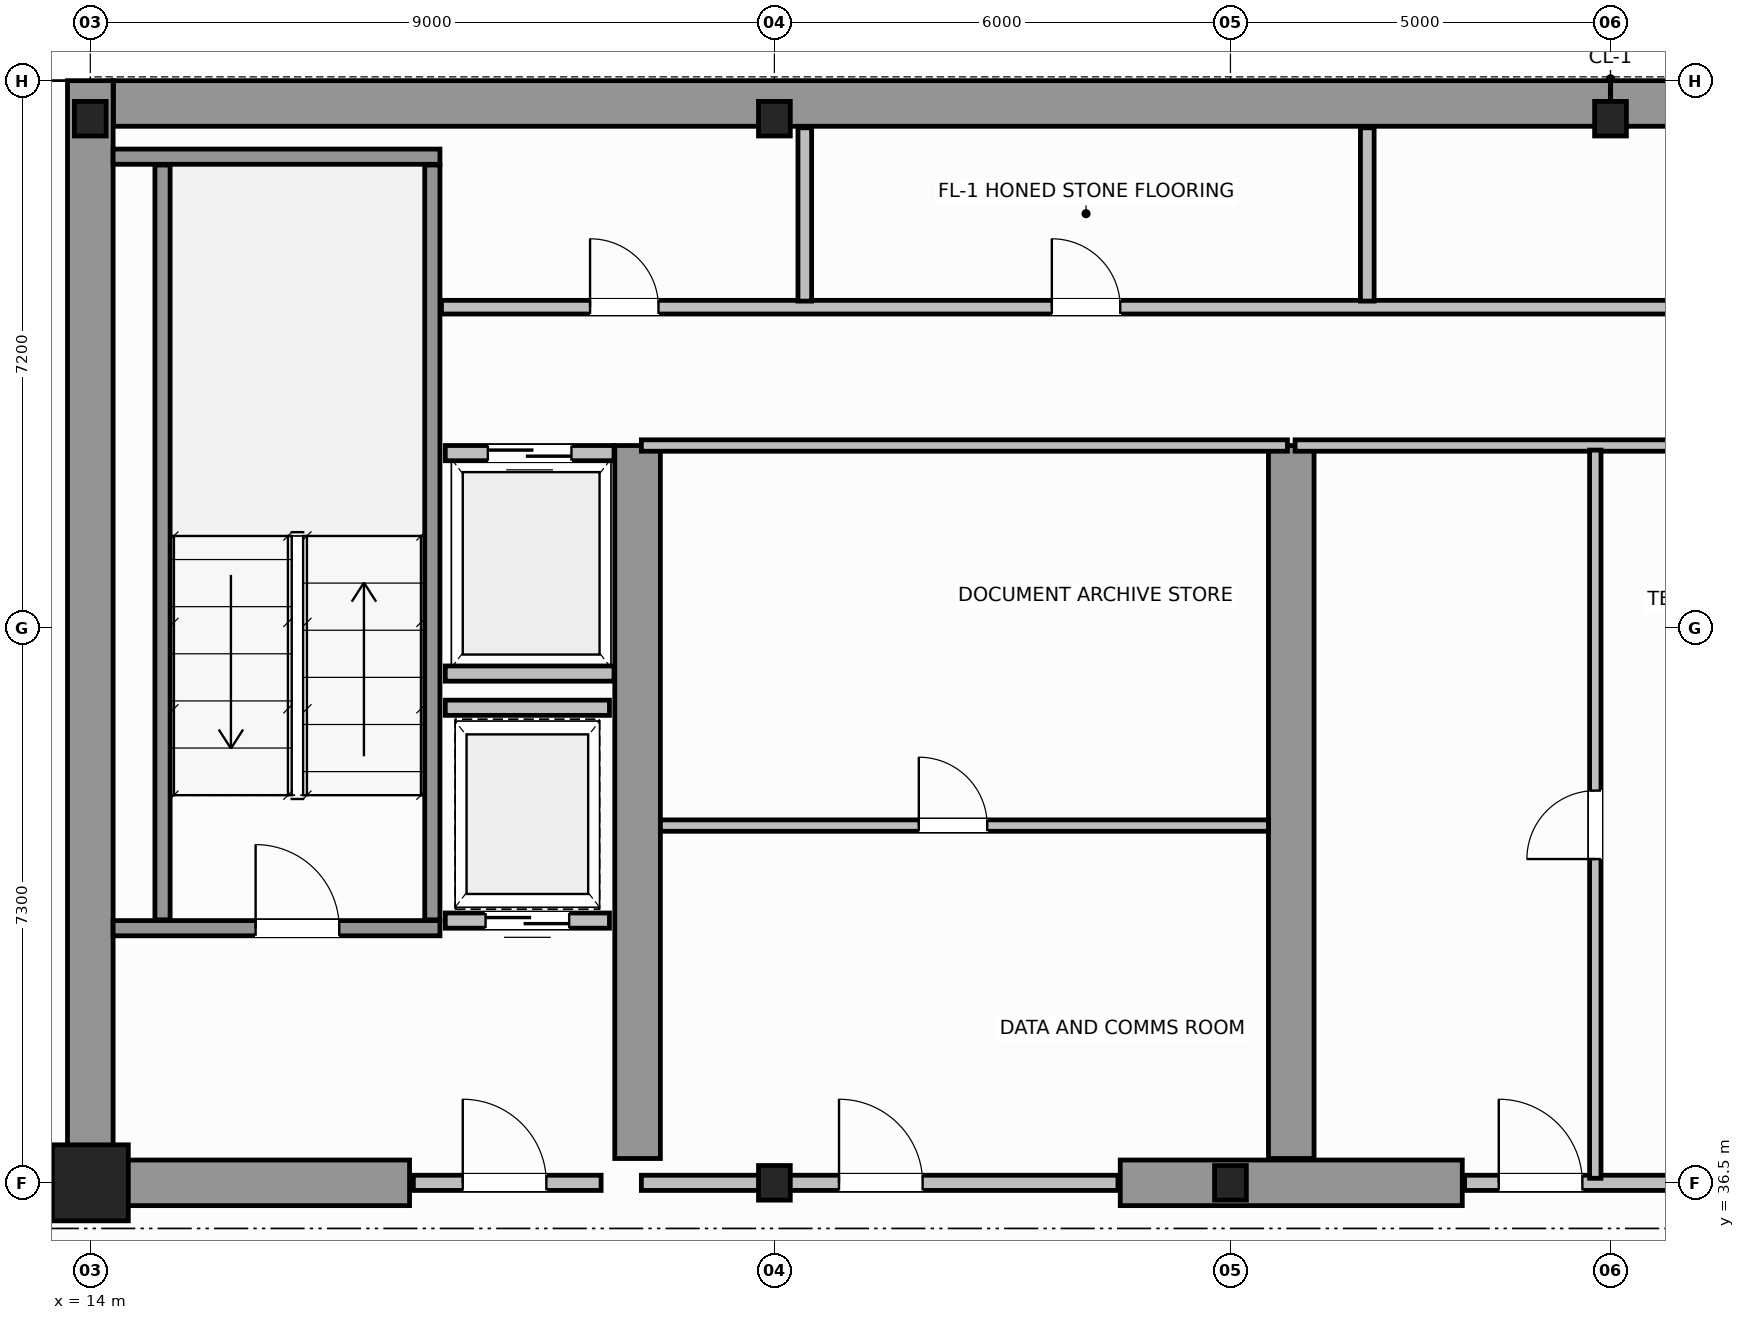
"""IFC4 building model, lengths in metres.
Left out: names, types, materials, properties, quantities, classifications, styles, units other than length and angle.
Written with IfcOpenShell. Run it as: python <this file> out.ifc"""

import sys

from ifc_helpers import new_model, si_unit, direction, frame, frame_2d, origin, origin_2d, place, context, subcontext, project, spatial, rectangle, i_section, extrude, source, transform, mapped, element, fill, save


model = new_model("IFC4")
c1 = context("Model", 3, precision=1e-05, world=origin(), true_north=direction((0.0, 1.0)))
c2 = subcontext(c1, "Body", "Model", "MODEL_VIEW")
j1 = project(units=[si_unit("LENGTHUNIT", "METRE"), si_unit("PLANEANGLEUNIT", "RADIAN")], contexts=[c1])
p1 = place(None, origin())
s1 = spatial("IfcSite", under=j1, at=p1, CompositionType="ELEMENT")
p2 = place(p1, origin())
s2 = spatial("IfcBuilding", under=s1, at=p2, CompositionType="ELEMENT")
p3 = place(p2, frame((0.0, 0.0, 238.4)))
s3 = spatial("IfcBuildingStorey", under=s2, at=p3, CompositionType="ELEMENT", Elevation=238.4)
m1 = source(origin(), c2, "Body", "SweptSolid", [
    extrude(rectangle(XDim=1.0, YDim=1.0, at=origin_2d()), origin(), (0.0, 0.0, 1.0), 3.8),
])
p4 = place(p3, frame((14.0, 36.5, 0.0), z_axis=(0.0, 0.0, 1.0), x_axis=(1.0, 0.0, 0.0)))
e1 = element("IfcColumn", 1, at=p4, inside=s3, PredefinedType="COLUMN", context=c2, shape_type="MappedRepresentation", body=[
    mapped(m1, transform((0.0, 0.0, 0.0), scale=1.0)),
])
m2 = source(origin(), c2, "Body", "SweptSolid", [
    extrude(i_section(OverallWidth=0.418, OverallDepth=0.455, WebThickness=0.042, FlangeThickness=0.058, FilletRadius=0.015, at=origin_2d()), origin(), (0.0, 0.0, 1.0), 3.8),
])
for number, where, z_axis, x_axis in (
    (2, (23.0, 36.5, 0.0), (0.0, 0.0, 1.0), (1.0, 0.0, 0.0)),
    (3, (29.0, 36.5, 0.0), (0.0, 0.0, 1.0), (1.0, 0.0, 0.0)),
    (4, (14.0, 50.5, 0.0), (0.0, 0.0, 1.0), (1.0, 0.0, 0.0)),
    (5, (23.0, 50.5, 0.0), (0.0, 0.0, 1.0), (1.0, 0.0, 0.0)),
    (6, (34.0, 50.5, 0.0), (0.0, 0.0, 1.0), (1.0, 0.0, 0.0)),
):
    element("IfcColumn", number, at=place(p3, frame(where, z_axis=z_axis, x_axis=x_axis)), inside=s3, PredefinedType="COLUMN", context=c2, shape_type="MappedRepresentation", body=[
        mapped(m2, transform((0.0, 0.0, 0.0), scale=1.0)),
    ])
for number, where, z_axis, x_axis in (
    (7, (14.304, 50.7, 0.0), (0.0, 0.0, 1.0), (1.0, 0.0, 0.0)),
    (8, (34.002, 50.7, 0.0), (0.0, 0.0, 1.0), (1.0, 0.0, 0.0)),
):
    element("IfcWall", number, at=place(p3, frame(where, z_axis=z_axis, x_axis=x_axis)), inside=s3, PredefinedType="SHEAR", context=c2, shape_type="SweptSolid", body=[
        extrude(rectangle(XDim=19.694, YDim=0.6, at=frame_2d((9.847, 0.0))), origin(), (0.0, 0.0, 1.0), 3.8),
    ])
p5 = place(p3, frame((14.0, 36.5, 0.0), z_axis=(0.0, 0.0, 1.0), x_axis=(0.0, 1.0, 0.0)))
e9 = element("IfcWall", 9, at=p5, inside=s3, PredefinedType="SHEAR", context=c2, shape_type="SweptSolid", body=[
    extrude(rectangle(XDim=14.5, YDim=0.6, at=frame_2d((7.25, 0.0))), origin(), (0.0, 0.0, 1.0), 3.8),
])
p6 = place(p3, frame((14.32, 36.5, 0.0), z_axis=(0.0, 0.0, 1.0), x_axis=(1.0, 0.0, 0.0)))
e10 = element("IfcWall", 10, at=p6, inside=s3, PredefinedType="SHEAR", context=c2, shape_type="SweptSolid", body=[
    extrude(rectangle(XDim=3.88, YDim=0.6, at=frame_2d((1.94, 0.0))), origin(), (0.0, 0.0, 1.0), 2.58),
])
p7 = place(p3, frame((27.55, 36.5, 0.0), z_axis=(0.0, 0.0, 1.0), x_axis=(1.0, 0.0, 0.0)))
e11 = element("IfcWall", 11, at=p7, inside=s3, PredefinedType="SHEAR", context=c2, shape_type="SweptSolid", body=[
    extrude(rectangle(XDim=4.5, YDim=0.6, at=frame_2d((2.25, 0.0))), origin(), (0.0, 0.0, 1.0), 3.8),
])
for number, where, z_axis, x_axis in (
    (12, (21.2, 36.82, 0.0), (0.0, 0.0, 1.0), (0.0, 1.0, 0.0)),
    (13, (29.8, 36.82, 0.0), (0.0, 0.0, 1.0), (0.0, 1.0, 0.0)),
):
    element("IfcWall", number, at=place(p3, frame(where, z_axis=z_axis, x_axis=x_axis)), inside=s3, PredefinedType="SHEAR", context=c2, shape_type="SweptSolid", body=[
        extrude(rectangle(XDim=9.38, YDim=0.6, at=frame_2d((4.69, 0.0))), origin(), (0.0, 0.0, 1.0), 3.8),
    ])
p8 = place(p3, frame((14.3, 39.85, 0.0), z_axis=(0.0, 0.0, 1.0), x_axis=(1.0, 0.0, 0.0)))
e14 = element("IfcWall", 14, at=p8, inside=s3, PredefinedType="SOLIDWALL", context=c2, shape_type="SweptSolid", body=[
    extrude(rectangle(XDim=4.3, YDim=0.2, at=frame_2d((2.15, 0.0))), origin(), (0.0, 0.0, 1.0), 3.8),
])
p9 = place(p8, frame((1.875, 0.0, 0.0)))
e15 = element("IfcOpeningElement", 15, at=p9, cuts=e14, PredefinedType="OPENING", context=c2, shape_type="SweptSolid", body=[
    extrude(rectangle(XDim=1.1, YDim=2.15, at=frame_2d((0.55, 1.075))), frame((0.0, 0.11, 0.0), z_axis=(0.0, -1.0, 0.0), x_axis=(1.0, 0.0, 0.0)), (0.0, 0.0, 1.0), 0.22),
])
p10 = place(p3, frame((14.3, 50.0, 0.0), z_axis=(0.0, 0.0, 1.0), x_axis=(1.0, 0.0, 0.0)))
e16 = element("IfcWall", 16, at=p10, inside=s3, PredefinedType="SOLIDWALL", context=c2, shape_type="SweptSolid", body=[
    extrude(rectangle(XDim=4.3, YDim=0.2, at=frame_2d((2.15, 0.0))), origin(), (0.0, 0.0, 1.0), 3.8),
])
for number, where, z_axis, x_axis in (
    (17, (14.95, 39.96, 0.0), (0.0, 0.0, 1.0), (0.0, 1.0, 0.0)),
    (18, (18.5, 39.96, 0.0), (0.0, 0.0, 1.0), (0.0, 1.0, 0.0)),
):
    element("IfcWall", number, at=place(p3, frame(where, z_axis=z_axis, x_axis=x_axis)), inside=s3, PredefinedType="SOLIDWALL", context=c2, shape_type="SweptSolid", body=[
        extrude(rectangle(XDim=9.93, YDim=0.2, at=frame_2d((4.965, 0.0))), origin(), (0.0, 0.0, 1.0), 3.8),
    ])
p11 = place(p3, frame((18.25, 36.5, 0.0), z_axis=(0.0, 0.0, 1.0), x_axis=(1.0, 0.0, 0.0)))
e19 = element("IfcWall", 19, at=p11, inside=s3, PredefinedType="SOLIDWALL", context=c2, shape_type="SweptSolid", body=[
    extrude(rectangle(XDim=2.47, YDim=0.2, at=frame_2d((1.235, 0.0))), origin(), (0.0, 0.0, 1.0), 2.57),
])
p12 = place(p11, frame((0.65, 0.0, 0.0)))
e20 = element("IfcOpeningElement", 20, at=p12, cuts=e19, PredefinedType="OPENING", context=c2, shape_type="SweptSolid", body=[
    extrude(rectangle(XDim=1.1, YDim=2.15, at=frame_2d((0.55, 1.075))), frame((0.0, 0.11, 0.0), z_axis=(0.0, -1.0, 0.0), x_axis=(1.0, 0.0, 0.0)), (0.0, 0.0, 1.0), 0.22),
])
p13 = place(p3, frame((18.67, 46.1, 0.0), z_axis=(0.0, 0.0, 1.0), x_axis=(1.0, 0.0, 0.0)))
e21 = element("IfcWall", 21, at=p13, inside=s3, PredefinedType="SOLIDWALL", context=c2, shape_type="SweptSolid", body=[
    extrude(rectangle(XDim=2.22, YDim=0.2, at=frame_2d((1.11, 0.0))), origin(), (0.0, 0.0, 1.0), 3.58),
])
p14 = place(p13, frame((0.56, 0.0, 0.0)))
e22 = element("IfcOpeningElement", 22, at=p14, cuts=e21, PredefinedType="OPENING", context=c2, shape_type="SweptSolid", body=[
    extrude(rectangle(XDim=1.1, YDim=2.15, at=frame_2d((0.55, 1.075))), frame((0.0, 0.11, 0.0), z_axis=(0.0, -1.0, 0.0), x_axis=(1.0, 0.0, 0.0)), (0.0, 0.0, 1.0), 0.22),
])
p15 = place(p3, frame((18.67, 43.2, 0.0), z_axis=(0.0, 0.0, 1.0), x_axis=(1.0, 0.0, 0.0)))
e23 = element("IfcWall", 23, at=p15, inside=s3, PredefinedType="SOLIDWALL", context=c2, shape_type="SweptSolid", body=[
    extrude(rectangle(XDim=2.22, YDim=0.2, at=frame_2d((1.11, 0.0))), origin(), (0.0, 0.0, 1.0), 3.58),
])
p16 = place(p3, frame((18.67, 39.95, 0.0), z_axis=(0.0, 0.0, 1.0), x_axis=(1.0, 0.0, 0.0)))
e24 = element("IfcWall", 24, at=p16, inside=s3, PredefinedType="SOLIDWALL", context=c2, shape_type="SweptSolid", body=[
    extrude(rectangle(XDim=2.16, YDim=0.2, at=frame_2d((1.08, 0.0))), origin(), (0.0, 0.0, 1.0), 3.58),
])
p17 = place(p16, frame((0.53, 0.0, 0.0)))
e25 = element("IfcOpeningElement", 25, at=p17, cuts=e24, PredefinedType="OPENING", context=c2, shape_type="SweptSolid", body=[
    extrude(rectangle(XDim=1.1, YDim=2.15, at=frame_2d((0.55, 1.075))), frame((0.0, 0.11, 0.0), z_axis=(0.0, -1.0, 0.0), x_axis=(1.0, 0.0, 0.0)), (0.0, 0.0, 1.0), 0.22),
])
p18 = place(p3, frame((18.67, 42.75, 0.0), z_axis=(0.0, 0.0, 1.0), x_axis=(1.0, 0.0, 0.0)))
e26 = element("IfcWall", 26, at=p18, inside=s3, PredefinedType="SOLIDWALL", context=c2, shape_type="SweptSolid", body=[
    extrude(rectangle(XDim=2.16, YDim=0.2, at=frame_2d((1.08, 0.0))), origin(), (0.0, 0.0, 1.0), 3.58),
])
p19 = place(p3, frame((21.25, 36.5, 0.0), z_axis=(0.0, 0.0, 1.0), x_axis=(1.0, 0.0, 0.0)))
e27 = element("IfcWall", 27, at=p19, inside=s3, PredefinedType="SOLIDWALL", context=c2, shape_type="SweptSolid", body=[
    extrude(rectangle(XDim=6.27, YDim=0.2, at=frame_2d((3.135, 0.0))), origin(), (0.0, 0.0, 1.0), 2.57),
])
p20 = place(p19, frame((2.6, 0.0, 0.0)))
e28 = element("IfcOpeningElement", 28, at=p20, cuts=e27, PredefinedType="OPENING", context=c2, shape_type="SweptSolid", body=[
    extrude(rectangle(XDim=1.1, YDim=2.15, at=frame_2d((0.55, 1.075))), frame((0.0, 0.11, 0.0), z_axis=(0.0, -1.0, 0.0), x_axis=(1.0, 0.0, 0.0)), (0.0, 0.0, 1.0), 0.22),
])
p21 = place(p3, frame((21.25, 46.2, 0.0), z_axis=(0.0, 0.0, 1.0), x_axis=(1.0, 0.0, 0.0)))
e29 = element("IfcWall", 29, at=p21, inside=s3, PredefinedType="PARTITIONING", context=c2, shape_type="SweptSolid", body=[
    extrude(rectangle(XDim=8.5, YDim=0.15, at=frame_2d((4.25, 0.0))), origin(), (0.0, 0.0, 1.0), 3.58),
])
p22 = place(p3, frame((21.5, 41.2, 0.0), z_axis=(0.0, 0.0, 1.0), x_axis=(1.0, 0.0, 0.0)))
e30 = element("IfcWall", 30, at=p22, inside=s3, PredefinedType="PARTITIONING", context=c2, shape_type="SweptSolid", body=[
    extrude(rectangle(XDim=8.0, YDim=0.15, at=frame_2d((4.0, 0.0))), origin(), (0.0, 0.0, 1.0), 3.58),
])
p23 = place(p22, frame((3.4, 0.0, 0.0)))
e31 = element("IfcOpeningElement", 31, at=p23, cuts=e30, PredefinedType="OPENING", context=c2, shape_type="SweptSolid", body=[
    extrude(rectangle(XDim=0.9, YDim=2.1, at=frame_2d((0.45, 1.05))), frame((0.0, 0.085, 0.0), z_axis=(0.0, -1.0, 0.0), x_axis=(1.0, 0.0, 0.0)), (0.0, 0.0, 1.0), 0.17),
])
p24 = place(p3, frame((32.08, 36.5, 0.0), z_axis=(0.0, 0.0, 1.0), x_axis=(1.0, 0.0, 0.0)))
e32 = element("IfcWall", 32, at=p24, inside=s3, PredefinedType="SOLIDWALL", context=c2, shape_type="SweptSolid", body=[
    extrude(rectangle(XDim=4.04, YDim=0.2, at=frame_2d((2.02, 0.0))), origin(), (0.0, 0.0, 1.0), 3.02),
])
p25 = place(p24, frame((0.45, 0.0, 0.0)))
e33 = element("IfcOpeningElement", 33, at=p25, cuts=e32, PredefinedType="OPENING", context=c2, shape_type="SweptSolid", body=[
    extrude(rectangle(XDim=1.1, YDim=2.15, at=frame_2d((0.55, 1.075))), frame((0.0, 0.11, 0.0), z_axis=(0.0, -1.0, 0.0), x_axis=(1.0, 0.0, 0.0)), (0.0, 0.0, 1.0), 0.22),
])
p26 = place(p3, frame((29.85, 46.2, 0.0), z_axis=(0.0, 0.0, 1.0), x_axis=(1.0, 0.0, 0.0)))
e34 = element("IfcWall", 34, at=p26, inside=s3, PredefinedType="PARTITIONING", context=c2, shape_type="SweptSolid", body=[
    extrude(rectangle(XDim=8.5, YDim=0.15, at=frame_2d((4.25, 0.0))), origin(), (0.0, 0.0, 1.0), 3.58),
])
p27 = place(p3, frame((33.8, 36.56, 0.0), z_axis=(0.0, 0.0, 1.0), x_axis=(0.0, 1.0, 0.0)))
e35 = element("IfcWall", 35, at=p27, inside=s3, PredefinedType="PARTITIONING", context=c2, shape_type="SweptSolid", body=[
    extrude(rectangle(XDim=9.58, YDim=0.15, at=frame_2d((4.79, 0.0))), origin(), (0.0, 0.0, 1.0), 3.58),
])
p28 = place(p27, frame((4.2, 0.0, 0.0)))
e36 = element("IfcOpeningElement", 36, at=p28, cuts=e35, PredefinedType="OPENING", context=c2, shape_type="SweptSolid", body=[
    extrude(rectangle(XDim=0.9, YDim=2.1, at=frame_2d((0.45, 1.05))), frame((0.0, 0.085, 0.0), z_axis=(0.0, -1.0, 0.0), x_axis=(1.0, 0.0, 0.0)), (0.0, 0.0, 1.0), 0.17),
])
p29 = place(p3, frame((18.62, 48.02, 0.0), z_axis=(0.0, 0.0, 1.0), x_axis=(1.0, 0.0, 0.0)))
e37 = element("IfcWall", 37, at=p29, inside=s3, PredefinedType="PLUMBINGWALL", context=c2, shape_type="SweptSolid", body=[
    extrude(rectangle(XDim=30.76, YDim=0.18, at=frame_2d((15.38, 0.0))), origin(), (0.0, 0.0, 1.0), 3.58),
])
p30 = place(p29, frame((1.955, 0.0, 0.0)))
e38 = element("IfcOpeningElement", 38, at=p30, cuts=e37, PredefinedType="OPENING", context=c2, shape_type="SweptSolid", body=[
    extrude(rectangle(XDim=0.9, YDim=2.15, at=frame_2d((0.45, 1.075))), frame((0.0, 0.1, 0.0), z_axis=(0.0, -1.0, 0.0), x_axis=(1.0, 0.0, 0.0)), (0.0, 0.0, 1.0), 0.2),
])
p31 = place(p29, frame((8.03, 0.0, 0.0)))
e39 = element("IfcOpeningElement", 39, at=p31, cuts=e37, PredefinedType="OPENING", context=c2, shape_type="SweptSolid", body=[
    extrude(rectangle(XDim=0.9, YDim=2.15, at=frame_2d((0.45, 1.075))), frame((0.0, 0.1, 0.0), z_axis=(0.0, -1.0, 0.0), x_axis=(1.0, 0.0, 0.0)), (0.0, 0.0, 1.0), 0.2),
])
p32 = place(p29, frame((16.93, 0.0, 0.0)))
e40 = element("IfcOpeningElement", 40, at=p32, cuts=e37, PredefinedType="OPENING", context=c2, shape_type="SweptSolid", body=[
    extrude(rectangle(XDim=0.9, YDim=2.15, at=frame_2d((0.45, 1.075))), frame((0.0, 0.1, 0.0), z_axis=(0.0, -1.0, 0.0), x_axis=(1.0, 0.0, 0.0)), (0.0, 0.0, 1.0), 0.2),
])
p33 = place(p29, frame((26.205, 0.0, 0.0)))
e41 = element("IfcOpeningElement", 41, at=p33, cuts=e37, PredefinedType="OPENING", context=c2, shape_type="SweptSolid", body=[
    extrude(rectangle(XDim=0.9, YDim=2.15, at=frame_2d((0.45, 1.075))), frame((0.0, 0.1, 0.0), z_axis=(0.0, -1.0, 0.0), x_axis=(1.0, 0.0, 0.0)), (0.0, 0.0, 1.0), 0.2),
])
for number, where, z_axis, x_axis in (
    (42, (23.4, 48.1, 0.0), (0.0, 0.0, 1.0), (0.0, 1.0, 0.0)),
    (43, (30.8, 48.1, 0.0), (0.0, 0.0, 1.0), (0.0, 1.0, 0.0)),
):
    element("IfcWall", number, at=place(p3, frame(where, z_axis=z_axis, x_axis=x_axis)), inside=s3, PredefinedType="PLUMBINGWALL", context=c2, shape_type="SweptSolid", body=[
        extrude(rectangle(XDim=2.28, YDim=0.18, at=frame_2d((1.14, 0.0))), origin(), (0.0, 0.0, 1.0), 3.58),
    ])
p34 = place(p3, frame((7.321, 36.48, 0.0), z_axis=(0.0, 0.0, 1.0), x_axis=(1.0, 0.0, 0.0)))
e44 = element("IfcWall", 44, at=p34, inside=s3, PredefinedType="PARTITIONING", context=c2, shape_type="SweptSolid", body=[
    extrude(rectangle(XDim=6.619, YDim=0.12, at=frame_2d((3.31, 0.0))), origin(), (0.0, 0.0, 1.0), 3.02),
])
p35 = place(p34, frame((2.859, 0.0, 0.0)))
e45 = element("IfcOpeningElement", 45, at=p35, cuts=e44, PredefinedType="OPENING", context=c2, shape_type="SweptSolid", body=[
    extrude(rectangle(XDim=0.9, YDim=2.15, at=frame_2d((0.45, 1.075))), frame((0.0, 0.07, 0.0), z_axis=(0.0, -1.0, 0.0), x_axis=(1.0, 0.0, 0.0)), (0.0, 0.0, 1.0), 0.14),
])
m3 = source(origin(), c2, "Body", "SweptSolid", [
    extrude(rectangle(XDim=1.1, YDim=2.15, at=frame_2d((0.55, 1.075))), frame((0.0, 0.025, 0.0), z_axis=(0.0, -1.0, 0.0), x_axis=(1.0, 0.0, 0.0)), (0.0, 0.0, 1.0), 0.05),
])
p36 = place(p9, origin())
e46 = element("IfcDoor", 46, at=p36, inside=s3, OperationType="SINGLE_SWING_LEFT", PredefinedType="DOOR", context=c2, shape_type="MappedRepresentation", body=[
    mapped(m3, transform((0.0, 0.0, 0.0), scale=1.0)),
])
fill(e15, e46)
p37 = place(p12, origin())
e47 = element("IfcDoor", 47, at=p37, inside=s3, OperationType="SINGLE_SWING_RIGHT", PredefinedType="DOOR", context=c2, shape_type="MappedRepresentation", body=[
    mapped(m3, transform((0.0, 0.0, 0.0), scale=1.0)),
])
fill(e20, e47)
p38 = place(p14, origin())
e48 = element("IfcDoor", 48, at=p38, inside=s3, OperationType="DOUBLE_DOOR_SLIDING", PredefinedType="DOOR", context=c2, shape_type="MappedRepresentation", body=[
    mapped(m3, transform((0.0, 0.0, 0.0), scale=1.0)),
])
fill(e22, e48)
p39 = place(p17, origin())
e49 = element("IfcDoor", 49, at=p39, inside=s3, OperationType="DOUBLE_DOOR_SLIDING", PredefinedType="DOOR", context=c2, shape_type="MappedRepresentation", body=[
    mapped(m3, transform((0.0, 0.0, 0.0), scale=1.0)),
])
fill(e25, e49)
p40 = place(p20, origin())
e50 = element("IfcDoor", 50, at=p40, inside=s3, OperationType="SINGLE_SWING_LEFT", PredefinedType="DOOR", context=c2, shape_type="MappedRepresentation", body=[
    mapped(m3, transform((0.0, 0.0, 0.0), scale=1.0)),
])
fill(e28, e50)
m4 = source(origin(), c2, "Body", "SweptSolid", [
    extrude(rectangle(XDim=0.9, YDim=2.1, at=frame_2d((0.45, 1.05))), frame((0.0, 0.025, 0.0), z_axis=(0.0, -1.0, 0.0), x_axis=(1.0, 0.0, 0.0)), (0.0, 0.0, 1.0), 0.05),
])
p41 = place(p23, origin())
e51 = element("IfcDoor", 51, at=p41, inside=s3, OperationType="SINGLE_SWING_RIGHT", PredefinedType="DOOR", context=c2, shape_type="MappedRepresentation", body=[
    mapped(m4, transform((0.0, 0.0, 0.0), scale=1.0)),
])
fill(e31, e51)
p42 = place(p25, origin())
e52 = element("IfcDoor", 52, at=p42, inside=s3, OperationType="SINGLE_SWING_LEFT", PredefinedType="DOOR", context=c2, shape_type="MappedRepresentation", body=[
    mapped(m3, transform((0.0, 0.0, 0.0), scale=1.0)),
])
fill(e33, e52)
p43 = place(p28, origin())
e53 = element("IfcDoor", 53, at=p43, inside=s3, OperationType="SINGLE_SWING_RIGHT", PredefinedType="DOOR", context=c2, shape_type="MappedRepresentation", body=[
    mapped(m4, transform((0.0, 0.0, 0.0), scale=1.0)),
])
fill(e36, e53)
m5 = source(origin(), c2, "Body", "SweptSolid", [
    extrude(rectangle(XDim=0.9, YDim=2.15, at=frame_2d((0.45, 1.075))), frame((0.0, 0.025, 0.0), z_axis=(0.0, -1.0, 0.0), x_axis=(1.0, 0.0, 0.0)), (0.0, 0.0, 1.0), 0.05),
])
p44 = place(p30, origin())
e54 = element("IfcDoor", 54, at=p44, inside=s3, OperationType="SINGLE_SWING_LEFT", PredefinedType="DOOR", context=c2, shape_type="MappedRepresentation", body=[
    mapped(m5, transform((0.0, 0.0, 0.0), scale=1.0)),
])
fill(e38, e54)
p45 = place(p31, origin())
e55 = element("IfcDoor", 55, at=p45, inside=s3, OperationType="SINGLE_SWING_RIGHT", PredefinedType="DOOR", context=c2, shape_type="MappedRepresentation", body=[
    mapped(m5, transform((0.0, 0.0, 0.0), scale=1.0)),
])
fill(e39, e55)
save(model, sys.argv[1])
